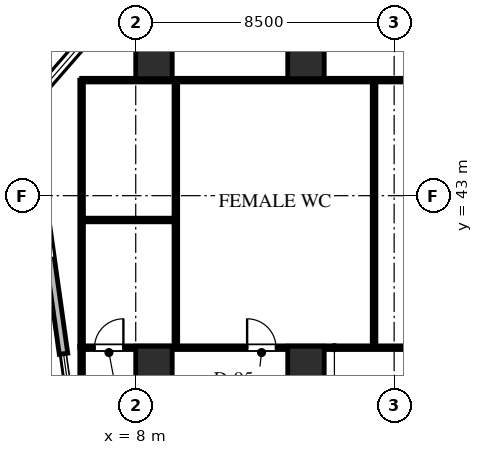
"""IFC4 building model, lengths in metres.
Left out: names, types, materials, properties, quantities, classifications, styles, units other than length and angle.
Written with IfcOpenShell. Run it as: python <this file> out.ifc"""

import sys

from ifc_helpers import new_model, si_unit, direction, frame, frame_2d, origin, origin_2d, place, context, subcontext, project, spatial, rectangle, extrude, element, fill, save


model = new_model("IFC4")
c1 = context("Model", 3, precision=1e-05, world=origin(), true_north=direction((0.0, 1.0)))
c2 = subcontext(c1, "Body", "Model", "MODEL_VIEW")
j1 = project(units=[si_unit("LENGTHUNIT", "METRE"), si_unit("PLANEANGLEUNIT", "RADIAN")], contexts=[c1])
p1 = place(None, origin())
s1 = spatial("IfcSite", under=j1, at=p1, CompositionType="ELEMENT")
p2 = place(p1, origin())
s2 = spatial("IfcBuilding", under=s1, at=p2, CompositionType="ELEMENT")
p3 = place(p2, frame((0.0, 0.0, 69.5)))
s3 = spatial("IfcBuildingStorey", under=s2, at=p3, CompositionType="ELEMENT", Elevation=69.5)
for number, where, z_axis, x_axis in (
    (1, (13.6, 37.35, 0.0), (0.0, 0.0, 1.0), (1.0, 0.0, 0.0)),
    (2, (13.6, 47.55, 0.0), (0.0, 0.0, 1.0), (1.0, 0.0, 0.0)),
    (3, (8.6, 37.35, 0.0), (0.0, 0.0, 1.0), (1.0, 0.0, 0.0)),
    (4, (8.6, 47.55, 0.0), (0.0, 0.0, 1.0), (1.0, 0.0, 0.0)),
):
    element("IfcColumn", number, at=place(p3, frame(where, z_axis=z_axis, x_axis=x_axis)), inside=s3, PredefinedType="COLUMN", context=c2, shape_type="SweptSolid", body=[
        extrude(rectangle(XDim=1.2, YDim=1.4, at=origin_2d()), origin(), (0.0, 0.0, 1.0), 4.0),
    ])
p4 = place(p3, frame((5.625, 37.8, 0.0), z_axis=(0.0, 0.0, 1.0), x_axis=(-0.139180172484, 0.990267074878, 0.0)))
e5 = element("IfcWall", 5, at=p4, inside=s3, PredefinedType="STANDARD", context=c2, shape_type="SweptSolid", body=[
    extrude(rectangle(XDim=8.267, YDim=0.28, at=frame_2d((4.134, 0.0))), origin(), (0.0, 0.0, 1.0), 3.74),
])
p5 = place(p4, frame((3.173, 0.0, 0.65)))
e6 = element("IfcOpeningElement", 6, at=p5, cuts=e5, PredefinedType="OPENING", context=c2, shape_type="SweptSolid", body=[
    extrude(rectangle(XDim=1.8, YDim=2.1, at=frame_2d((0.9, 1.05))), frame((0.0, 0.15, 0.0), z_axis=(0.0, -1.0, 0.0), x_axis=(1.0, 0.0, 0.0)), (0.0, 0.0, 1.0), 0.3),
])
p6 = place(p3, frame((4.474, 45.987, 0.0), z_axis=(0.0, 0.0, 1.0), x_axis=(0.656070053895, 0.754699996278, 0.0)))
e7 = element("IfcWall", 7, at=p6, inside=s3, PredefinedType="STANDARD", context=c2, shape_type="SweptSolid", body=[
    extrude(rectangle(XDim=3.171, YDim=0.28, at=frame_2d((1.585, 0.0))), origin(), (0.0, 0.0, 1.0), 3.74),
])
p7 = place(p6, frame((0.667, 0.0, 0.65)))
e8 = element("IfcOpeningElement", 8, at=p7, cuts=e7, PredefinedType="OPENING", context=c2, shape_type="SweptSolid", body=[
    extrude(rectangle(XDim=1.8, YDim=2.1, at=frame_2d((0.9, 1.05))), frame((0.0, 0.15, 0.0), z_axis=(0.0, -1.0, 0.0), x_axis=(1.0, 0.0, 0.0)), (0.0, 0.0, 1.0), 0.3),
])
p8 = place(p3, frame((6.22, 38.0, 0.0), z_axis=(0.0, 0.0, 1.0), x_axis=(1.0, 0.0, 0.0)))
e9 = element("IfcWall", 9, at=p8, inside=s3, PredefinedType="PARTITIONING", context=c2, shape_type="SweptSolid", body=[
    extrude(rectangle(XDim=16.63, YDim=0.12, at=frame_2d((8.315, 0.0))), origin(), (0.0, 0.0, 1.0), 2.813),
])
p9 = place(p8, frame((0.424, 0.0, 0.0)))
e10 = element("IfcOpeningElement", 10, at=p9, cuts=e9, PredefinedType="OPENING", context=c2, shape_type="SweptSolid", body=[
    extrude(rectangle(XDim=0.95, YDim=2.15, at=frame_2d((0.475, 1.075))), frame((0.0, 0.07, 0.0), z_axis=(0.0, -1.0, 0.0), x_axis=(1.0, 0.0, 0.0)), (0.0, 0.0, 1.0), 0.14),
])
p10 = place(p8, frame((5.444, 0.0, 0.0)))
e11 = element("IfcOpeningElement", 11, at=p10, cuts=e9, PredefinedType="OPENING", context=c2, shape_type="SweptSolid", body=[
    extrude(rectangle(XDim=0.95, YDim=2.15, at=frame_2d((0.475, 1.075))), frame((0.0, 0.07, 0.0), z_axis=(0.0, -1.0, 0.0), x_axis=(1.0, 0.0, 0.0)), (0.0, 0.0, 1.0), 0.14),
])
p11 = place(p8, frame((13.344, 0.0, 0.0)))
e12 = element("IfcOpeningElement", 12, at=p11, cuts=e9, PredefinedType="OPENING", context=c2, shape_type="SweptSolid", body=[
    extrude(rectangle(XDim=0.95, YDim=2.15, at=frame_2d((0.475, 1.075))), frame((0.0, 0.07, 0.0), z_axis=(0.0, -1.0, 0.0), x_axis=(1.0, 0.0, 0.0)), (0.0, 0.0, 1.0), 0.14),
])
p12 = place(p3, frame((6.22, 38.0, 0.0), z_axis=(0.0, 0.0, 1.0), x_axis=(0.0, 1.0, 0.0)))
e13 = element("IfcWall", 13, at=p12, inside=s3, PredefinedType="PARTITIONING", context=c2, shape_type="SweptSolid", body=[
    extrude(rectangle(XDim=8.8, YDim=0.12, at=frame_2d((4.4, 0.0))), origin(), (0.0, 0.0, 1.0), 3.74),
])
p13 = place(p3, frame((6.22, 46.8, 0.0), z_axis=(0.0, 0.0, 1.0), x_axis=(1.0, 0.0, 0.0)))
e14 = element("IfcWall", 14, at=p13, inside=s3, PredefinedType="PARTITIONING", context=c2, shape_type="SweptSolid", body=[
    extrude(rectangle(XDim=16.68, YDim=0.12, at=frame_2d((8.34, 0.0))), origin(), (0.0, 0.0, 1.0), 2.813),
])
for number, where, z_axis, x_axis in (
    (15, (9.32, 38.068, 0.0), (0.0, 0.0, 1.0), (0.0, 1.0, 0.0)),
    (16, (15.84, 38.068, 0.0), (0.0, 0.0, 1.0), (0.0, 1.0, 0.0)),
):
    element("IfcWall", number, at=place(p3, frame(where, z_axis=z_axis, x_axis=x_axis)), inside=s3, PredefinedType="PARTITIONING", context=c2, shape_type="SweptSolid", body=[
        extrude(rectangle(XDim=8.664, YDim=0.12, at=frame_2d((4.332, 0.0))), origin(), (0.0, 0.0, 1.0), 3.74),
    ])
p14 = place(p3, frame((6.288, 42.2, 0.0), z_axis=(0.0, 0.0, 1.0), x_axis=(1.0, 0.0, 0.0)))
e17 = element("IfcWall", 17, at=p14, inside=s3, PredefinedType="PARTITIONING", context=c2, shape_type="SweptSolid", body=[
    extrude(rectangle(XDim=2.964, YDim=0.12, at=frame_2d((1.482, 0.0))), origin(), (0.0, 0.0, 1.0), 2.813),
])
p15 = place(p3, frame((6.22, 34.4, 0.0), z_axis=(0.0, 0.0, 1.0), x_axis=(0.0, 1.0, 0.0)))
e18 = element("IfcWall", 18, at=p15, inside=s3, PredefinedType="PARTITIONING", context=c2, shape_type="SweptSolid", body=[
    extrude(rectangle(XDim=3.65, YDim=0.12, at=frame_2d((1.825, 0.0))), origin(), (0.0, 0.0, 1.0), 3.74),
])
p16 = place(p7, origin())
e19 = element("IfcWindow", 19, at=p16, inside=s3, PartitioningType="SINGLE_PANEL", PredefinedType="WINDOW", context=c2, shape_type="SweptSolid", body=[
    extrude(rectangle(XDim=1.8, YDim=2.1, at=frame_2d((0.9, 1.05))), frame((0.0, 0.03, 0.0), z_axis=(0.0, -1.0, 0.0), x_axis=(1.0, 0.0, 0.0)), (0.0, 0.0, 1.0), 0.06),
])
fill(e8, e19)
p17 = place(p9, origin())
e20 = element("IfcDoor", 20, at=p17, inside=s3, OperationType="SINGLE_SWING_RIGHT", PredefinedType="DOOR", context=c2, shape_type="SweptSolid", body=[
    extrude(rectangle(XDim=0.95, YDim=2.15, at=frame_2d((0.475, 1.075))), frame((0.0, 0.025, 0.0), z_axis=(0.0, -1.0, 0.0), x_axis=(1.0, 0.0, 0.0)), (0.0, 0.0, 1.0), 0.05),
])
fill(e10, e20)
p18 = place(p10, origin())
e21 = element("IfcDoor", 21, at=p18, inside=s3, OperationType="SINGLE_SWING_LEFT", PredefinedType="DOOR", context=c2, shape_type="SweptSolid", body=[
    extrude(rectangle(XDim=0.95, YDim=2.15, at=frame_2d((0.475, 1.075))), frame((0.0, 0.025, 0.0), z_axis=(0.0, -1.0, 0.0), x_axis=(1.0, 0.0, 0.0)), (0.0, 0.0, 1.0), 0.05),
])
fill(e11, e21)
save(model, sys.argv[1])
